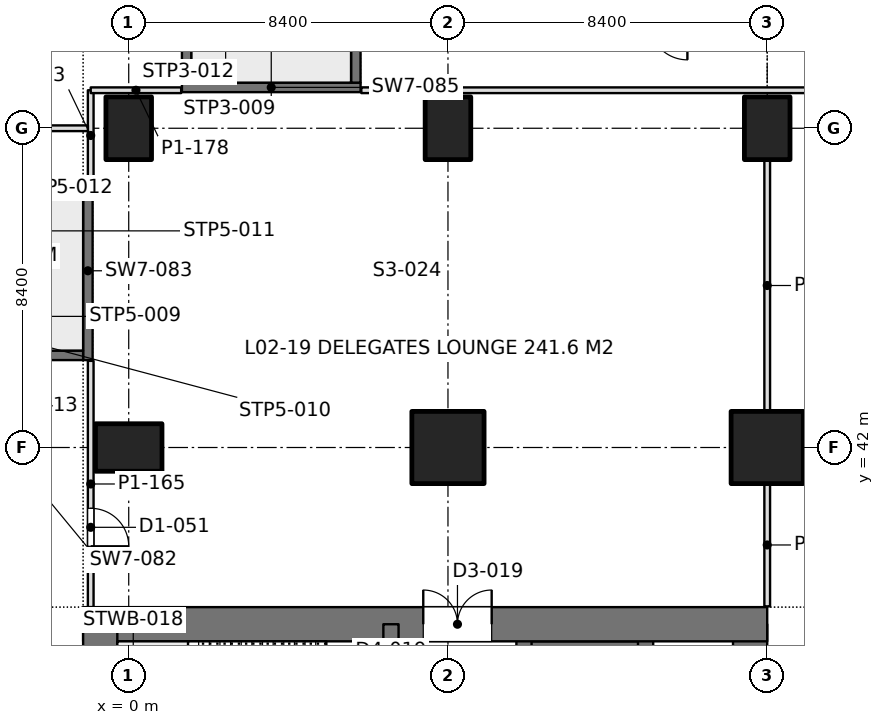
"""IFC4 building model, lengths in metres.
Left out: names, types, materials, properties, quantities, classifications, styles, units other than length and angle.
Written with IfcOpenShell. Run it as: python <this file> out.ifc"""

import sys

from ifc_helpers import new_model, si_unit, direction, frame, frame_2d, origin, origin_2d, place, context, subcontext, project, spatial, rectangle, extrude, element, fill, save


model = new_model("IFC4")
c1 = context("Model", 3, precision=1e-05, world=origin(), true_north=direction((0.0, 1.0)))
c2 = subcontext(c1, "Body", "Model", "MODEL_VIEW")
j1 = project(units=[si_unit("LENGTHUNIT", "METRE"), si_unit("PLANEANGLEUNIT", "RADIAN")], contexts=[c1])
p1 = place(None, origin())
s1 = spatial("IfcSite", under=j1, at=p1, CompositionType="ELEMENT")
p2 = place(p1, origin())
s2 = spatial("IfcBuilding", under=s1, at=p2, CompositionType="ELEMENT")
p3 = place(p2, frame((0.0, 0.0, 9.9)))
s3 = spatial("IfcBuildingStorey", under=s2, at=p3, CompositionType="ELEMENT", Elevation=9.9)
p4 = place(p3, frame((0.0, 42.0, 0.0), z_axis=(0.0, 0.0, 1.0), x_axis=(0.0, 1.0, 0.0)))
e1 = element("IfcColumn", 1, at=p4, inside=s3, PredefinedType="COLUMN", context=c2, shape_type="SweptSolid", body=[
    extrude(rectangle(XDim=1.25, YDim=1.75, at=origin_2d()), origin(), (0.0, 0.0, 1.0), 4.5),
])
p5 = place(p3, frame((0.0, 50.4, 0.0), z_axis=(0.0, 0.0, 1.0), x_axis=(1.0, 0.0, 0.0)))
e2 = element("IfcColumn", 2, at=p5, inside=s3, PredefinedType="COLUMN", context=c2, shape_type="SweptSolid", body=[
    extrude(rectangle(XDim=1.2, YDim=1.65, at=origin_2d()), origin(), (0.0, 0.0, 1.0), 4.5),
])
p6 = place(p3, frame((8.4, 42.0, 0.0), z_axis=(0.0, 0.0, 1.0), x_axis=(1.0, 0.0, 0.0)))
e3 = element("IfcColumn", 3, at=p6, inside=s3, PredefinedType="COLUMN", context=c2, shape_type="SweptSolid", body=[
    extrude(rectangle(XDim=1.9, YDim=1.9, at=origin_2d()), origin(), (0.0, 0.0, 1.0), 4.5),
])
p7 = place(p3, frame((8.4, 50.4, 0.0), z_axis=(0.0, 0.0, 1.0), x_axis=(1.0, 0.0, 0.0)))
e4 = element("IfcColumn", 4, at=p7, inside=s3, PredefinedType="COLUMN", context=c2, shape_type="SweptSolid", body=[
    extrude(rectangle(XDim=1.2, YDim=1.65, at=origin_2d()), origin(), (0.0, 0.0, 1.0), 4.5),
])
p8 = place(p3, frame((16.8, 42.0, 0.0), z_axis=(0.0, 0.0, 1.0), x_axis=(1.0, 0.0, 0.0)))
e5 = element("IfcColumn", 5, at=p8, inside=s3, PredefinedType="COLUMN", context=c2, shape_type="SweptSolid", body=[
    extrude(rectangle(XDim=1.9, YDim=1.9, at=origin_2d()), origin(), (0.0, 0.0, 1.0), 4.5),
])
p9 = place(p3, frame((16.8, 50.4, 0.0), z_axis=(0.0, 0.0, 1.0), x_axis=(1.0, 0.0, 0.0)))
e6 = element("IfcColumn", 6, at=p9, inside=s3, PredefinedType="COLUMN", context=c2, shape_type="SweptSolid", body=[
    extrude(rectangle(XDim=1.2, YDim=1.65, at=origin_2d()), origin(), (0.0, 0.0, 1.0), 4.5),
])
p10 = place(p3, frame((-1.2, 37.35, 0.0), z_axis=(0.0, 0.0, 1.0), x_axis=(1.0, 0.0, 0.0)))
e7 = element("IfcWall", 7, at=p10, inside=s3, PredefinedType="SHEAR", context=c2, shape_type="SweptSolid", body=[
    extrude(rectangle(XDim=18.0, YDim=0.9, at=frame_2d((9.0, 0.0))), origin(), (0.0, 0.0, 1.0), 4.5),
])
p11 = place(p10, frame((8.95, 0.0, 0.0)))
e8 = element("IfcOpeningElement", 8, at=p11, cuts=e7, PredefinedType="OPENING", context=c2, shape_type="SweptSolid", body=[
    extrude(rectangle(XDim=1.8, YDim=2.4, at=frame_2d((0.9, 1.2))), frame((0.0, 0.46, 0.0), z_axis=(0.0, -1.0, 0.0), x_axis=(1.0, 0.0, 0.0)), (0.0, 0.0, 1.0), 0.92),
])
for number, where, z_axis, x_axis in (
    (9, (-0.75, 13.05, 0.0), (0.0, 0.0, 1.0), (0.0, 1.0, 0.0)),
    (10, (16.35, 13.05, 0.0), (0.0, 0.0, 1.0), (0.0, 1.0, 0.0)),
):
    element("IfcWall", number, at=place(p3, frame(where, z_axis=z_axis, x_axis=x_axis)), inside=s3, PredefinedType="SHEAR", context=c2, shape_type="SweptSolid", body=[
        extrude(rectangle(XDim=24.3, YDim=0.9, at=frame_2d((12.15, 0.0))), origin(), (0.0, 0.0, 1.0), 4.5),
    ])
p12 = place(p3, frame((6.9, 13.05, 0.0), z_axis=(0.0, 0.0, 1.0), x_axis=(0.0, 1.0, 0.0)))
e11 = element("IfcWall", 11, at=p12, inside=s3, PredefinedType="SHEAR", context=c2, shape_type="SweptSolid", body=[
    extrude(rectangle(XDim=24.3, YDim=0.4, at=frame_2d((12.15, 0.0))), origin(), (0.0, 0.0, 1.0), 4.5),
])
p13 = place(p12, frame((1.3, 0.0, 0.0)))
e12 = element("IfcOpeningElement", 12, at=p13, cuts=e11, PredefinedType="OPENING", context=c2, shape_type="SweptSolid", body=[
    extrude(rectangle(XDim=1.0, YDim=2.2, at=frame_2d((0.5, 1.1))), frame((0.0, 0.21, 0.0), z_axis=(0.0, -1.0, 0.0), x_axis=(1.0, 0.0, 0.0)), (0.0, 0.0, 1.0), 0.42),
])
p14 = place(p12, frame((22.0, 0.0, 0.0)))
e13 = element("IfcOpeningElement", 13, at=p14, cuts=e11, PredefinedType="OPENING", context=c2, shape_type="SweptSolid", body=[
    extrude(rectangle(XDim=1.0, YDim=2.2, at=frame_2d((0.5, 1.1))), frame((0.0, 0.21, 0.0), z_axis=(0.0, -1.0, 0.0), x_axis=(1.0, 0.0, 0.0)), (0.0, 0.0, 1.0), 0.42),
])
p15 = place(p12, frame((5.55, 0.0, 0.0)))
e14 = element("IfcOpeningElement", 14, at=p15, cuts=e11, PredefinedType="OPENING", context=c2, shape_type="SweptSolid", body=[
    extrude(rectangle(XDim=1.0, YDim=2.2, at=frame_2d((0.5, 1.1))), frame((0.0, 0.21, 0.0), z_axis=(0.0, -1.0, 0.0), x_axis=(1.0, 0.0, 0.0)), (0.0, 0.0, 1.0), 0.42),
])
p16 = place(p12, frame((9.55, 0.0, 0.0)))
e15 = element("IfcOpeningElement", 15, at=p16, cuts=e11, PredefinedType="OPENING", context=c2, shape_type="SweptSolid", body=[
    extrude(rectangle(XDim=1.0, YDim=2.2, at=frame_2d((0.5, 1.1))), frame((0.0, 0.21, 0.0), z_axis=(0.0, -1.0, 0.0), x_axis=(1.0, 0.0, 0.0)), (0.0, 0.0, 1.0), 0.42),
])
p17 = place(p12, frame((12.8, 0.0, 0.0)))
e16 = element("IfcOpeningElement", 16, at=p17, cuts=e11, PredefinedType="OPENING", context=c2, shape_type="SweptSolid", body=[
    extrude(rectangle(XDim=1.1, YDim=2.2, at=frame_2d((0.55, 1.1))), frame((0.0, 0.21, 0.0), z_axis=(0.0, -1.0, 0.0), x_axis=(1.0, 0.0, 0.0)), (0.0, 0.0, 1.0), 0.42),
])
p18 = place(p12, frame((15.538, 0.0, 0.0)))
e17 = element("IfcOpeningElement", 17, at=p18, cuts=e11, PredefinedType="OPENING", context=c2, shape_type="SweptSolid", body=[
    extrude(rectangle(XDim=1.1, YDim=2.2, at=frame_2d((0.55, 1.1))), frame((0.0, 0.21, 0.0), z_axis=(0.0, -1.0, 0.0), x_axis=(1.0, 0.0, 0.0)), (0.0, 0.0, 1.0), 0.42),
])
p19 = place(p12, frame((18.262, 0.0, 0.0)))
e18 = element("IfcOpeningElement", 18, at=p19, cuts=e11, PredefinedType="OPENING", context=c2, shape_type="SweptSolid", body=[
    extrude(rectangle(XDim=1.1, YDim=2.2, at=frame_2d((0.55, 1.1))), frame((0.0, 0.21, 0.0), z_axis=(0.0, -1.0, 0.0), x_axis=(1.0, 0.0, 0.0)), (0.0, 0.0, 1.0), 0.42),
])
p20 = place(p3, frame((10.4, 13.05, 0.0), z_axis=(0.0, 0.0, 1.0), x_axis=(0.0, 1.0, 0.0)))
e19 = element("IfcWall", 19, at=p20, inside=s3, PredefinedType="SHEAR", context=c2, shape_type="SweptSolid", body=[
    extrude(rectangle(XDim=24.3, YDim=0.4, at=frame_2d((12.15, 0.0))), origin(), (0.0, 0.0, 1.0), 4.5),
])
p21 = place(p20, frame((1.5, 0.0, 0.0)))
e20 = element("IfcOpeningElement", 20, at=p21, cuts=e19, PredefinedType="OPENING", context=c2, shape_type="SweptSolid", body=[
    extrude(rectangle(XDim=1.1, YDim=2.2, at=frame_2d((0.55, 1.1))), frame((0.0, 0.21, 0.0), z_axis=(0.0, -1.0, 0.0), x_axis=(1.0, 0.0, 0.0)), (0.0, 0.0, 1.0), 0.42),
])
p22 = place(p20, frame((4.35, 0.0, 0.0)))
e21 = element("IfcOpeningElement", 21, at=p22, cuts=e19, PredefinedType="OPENING", context=c2, shape_type="SweptSolid", body=[
    extrude(rectangle(XDim=1.1, YDim=2.2, at=frame_2d((0.55, 1.1))), frame((0.0, 0.21, 0.0), z_axis=(0.0, -1.0, 0.0), x_axis=(1.0, 0.0, 0.0)), (0.0, 0.0, 1.0), 0.42),
])
p23 = place(p20, frame((7.2, 0.0, 0.0)))
e22 = element("IfcOpeningElement", 22, at=p23, cuts=e19, PredefinedType="OPENING", context=c2, shape_type="SweptSolid", body=[
    extrude(rectangle(XDim=1.1, YDim=2.2, at=frame_2d((0.55, 1.1))), frame((0.0, 0.21, 0.0), z_axis=(0.0, -1.0, 0.0), x_axis=(1.0, 0.0, 0.0)), (0.0, 0.0, 1.0), 0.42),
])
p24 = place(p20, frame((21.45, 0.0, 0.0)))
e23 = element("IfcOpeningElement", 23, at=p24, cuts=e19, PredefinedType="OPENING", context=c2, shape_type="SweptSolid", body=[
    extrude(rectangle(XDim=1.1, YDim=2.2, at=frame_2d((0.55, 1.1))), frame((0.0, 0.21, 0.0), z_axis=(0.0, -1.0, 0.0), x_axis=(1.0, 0.0, 0.0)), (0.0, 0.0, 1.0), 0.42),
])
p25 = place(p3, frame((13.6, 13.05, 0.0), z_axis=(0.0, 0.0, 1.0), x_axis=(0.0, 1.0, 0.0)))
e24 = element("IfcWall", 24, at=p25, inside=s3, PredefinedType="SHEAR", context=c2, shape_type="SweptSolid", body=[
    extrude(rectangle(XDim=24.3, YDim=0.4, at=frame_2d((12.15, 0.0))), origin(), (0.0, 0.0, 1.0), 4.5),
])
p26 = place(p3, frame((10.4, 36.625, 0.0), z_axis=(0.0, 0.0, 1.0), x_axis=(1.0, 0.0, 0.0)))
e25 = element("IfcWall", 25, at=p26, inside=s3, PredefinedType="SHEAR", context=c2, shape_type="SweptSolid", body=[
    extrude(rectangle(XDim=3.2, YDim=0.55, at=frame_2d((1.6, 0.0))), origin(), (0.0, 0.0, 1.0), 4.5),
])
p27 = place(p3, frame((-1.0, 51.4, 0.0), z_axis=(0.0, 0.0, 1.0), x_axis=(1.0, 0.0, 0.0)))
e26 = element("IfcWall", 26, at=p27, inside=s3, PredefinedType="PARTITIONING", context=c2, shape_type="SweptSolid", body=[
    extrude(rectangle(XDim=2.38, YDim=0.15, at=frame_2d((1.19, 0.0))), origin(), (0.0, 0.0, 1.0), 3.65),
])
p28 = place(p3, frame((6.12, 51.4, 0.0), z_axis=(0.0, 0.0, 1.0), x_axis=(1.0, 0.0, 0.0)))
e27 = element("IfcWall", 27, at=p28, inside=s3, PredefinedType="PARTITIONING", context=c2, shape_type="SweptSolid", body=[
    extrude(rectangle(XDim=38.16, YDim=0.15, at=frame_2d((19.08, 0.0))), origin(), (0.0, 0.0, 1.0), 3.65),
])
p29 = place(p28, frame((13.98, 0.0, 0.0)))
e28 = element("IfcOpeningElement", 28, at=p29, cuts=e27, PredefinedType="OPENING", context=c2, shape_type="SweptSolid", body=[
    extrude(rectangle(XDim=1.8, YDim=2.2, at=frame_2d((0.9, 1.1))), frame((0.0, 0.085, 0.0), z_axis=(0.0, -1.0, 0.0), x_axis=(1.0, 0.0, 0.0)), (0.0, 0.0, 1.0), 0.17),
])
p30 = place(p28, frame((22.38, 0.0, 0.0)))
e29 = element("IfcOpeningElement", 29, at=p30, cuts=e27, PredefinedType="OPENING", context=c2, shape_type="SweptSolid", body=[
    extrude(rectangle(XDim=1.8, YDim=2.2, at=frame_2d((0.9, 1.1))), frame((0.0, 0.085, 0.0), z_axis=(0.0, -1.0, 0.0), x_axis=(1.0, 0.0, 0.0)), (0.0, 0.0, 1.0), 0.17),
])
p31 = place(p3, frame((-8.001, 50.4, 0.0), z_axis=(0.0, 0.0, 1.0), x_axis=(1.0, 0.0, 0.0)))
e30 = element("IfcWall", 30, at=p31, inside=s3, PredefinedType="PARTITIONING", context=c2, shape_type="SweptSolid", body=[
    extrude(rectangle(XDim=6.927, YDim=0.15, at=frame_2d((3.463, 0.0))), origin(), (0.0, 0.0, 1.0), 3.65),
])
p32 = place(p31, frame((2.501, 0.0, 0.0)))
e31 = element("IfcOpeningElement", 31, at=p32, cuts=e30, PredefinedType="OPENING", context=c2, shape_type="SweptSolid", body=[
    extrude(rectangle(XDim=1.0, YDim=2.2, at=frame_2d((0.5, 1.1))), frame((0.0, 0.085, 0.0), z_axis=(0.0, -1.0, 0.0), x_axis=(1.0, 0.0, 0.0)), (0.0, 0.0, 1.0), 0.17),
])
p33 = place(p3, frame((-1.0, 37.8, 0.0), z_axis=(0.0, 0.0, 1.0), x_axis=(0.0, 1.0, 0.0)))
e32 = element("IfcWall", 32, at=p33, inside=s3, PredefinedType="PARTITIONING", context=c2, shape_type="SweptSolid", body=[
    extrude(rectangle(XDim=6.48, YDim=0.15, at=frame_2d((3.24, 0.0))), origin(), (0.0, 0.0, 1.0), 3.65),
])
p34 = place(p33, frame((1.6, 0.0, 0.0)))
e33 = element("IfcOpeningElement", 33, at=p34, cuts=e32, PredefinedType="OPENING", context=c2, shape_type="SweptSolid", body=[
    extrude(rectangle(XDim=1.0, YDim=2.2, at=frame_2d((0.5, 1.1))), frame((0.0, 0.085, 0.0), z_axis=(0.0, -1.0, 0.0), x_axis=(1.0, 0.0, 0.0)), (0.0, 0.0, 1.0), 0.17),
])
p35 = place(p3, frame((-1.0, 49.02, 0.0), z_axis=(0.0, 0.0, 1.0), x_axis=(0.0, 1.0, 0.0)))
e34 = element("IfcWall", 34, at=p35, inside=s3, PredefinedType="PARTITIONING", context=c2, shape_type="SweptSolid", body=[
    extrude(rectangle(XDim=2.38, YDim=0.15, at=frame_2d((1.19, 0.0))), origin(), (0.0, 0.0, 1.0), 3.65),
])
p36 = place(p3, frame((16.8, 37.82, 0.0), z_axis=(0.0, 0.0, 1.0), x_axis=(0.0, 1.0, 0.0)))
e35 = element("IfcWall", 35, at=p36, inside=s3, PredefinedType="PARTITIONING", context=c2, shape_type="SweptSolid", body=[
    extrude(rectangle(XDim=3.231, YDim=0.15, at=frame_2d((1.615, 0.0))), origin(), (0.0, 0.0, 1.0), 3.94),
])
p37 = place(p3, frame((16.8, 42.949, 0.0), z_axis=(0.0, 0.0, 1.0), x_axis=(0.0, 1.0, 0.0)))
e36 = element("IfcWall", 36, at=p37, inside=s3, PredefinedType="PARTITIONING", context=c2, shape_type="SweptSolid", body=[
    extrude(rectangle(XDim=6.627, YDim=0.15, at=frame_2d((3.313, 0.0))), origin(), (0.0, 0.0, 1.0), 3.65),
])
p38 = place(p3, frame((1.525, 59.702, 0.0), z_axis=(0.0, 0.0, 1.0), x_axis=(0.0, -1.0, 0.0)))
e37 = element("IfcWall", 37, at=p38, inside=s3, PredefinedType="SOLIDWALL", context=c2, shape_type="SweptSolid", body=[
    extrude(rectangle(XDim=8.102, YDim=0.25, at=frame_2d((4.051, 0.0))), origin(), (0.0, 0.0, 1.0), 4.5),
])
p39 = place(p3, frame((5.975, 59.702, 0.0), z_axis=(0.0, 0.0, 1.0), x_axis=(0.0, -1.0, 0.0)))
e38 = element("IfcWall", 38, at=p39, inside=s3, PredefinedType="SOLIDWALL", context=c2, shape_type="SweptSolid", body=[
    extrude(rectangle(XDim=8.102, YDim=0.25, at=frame_2d((4.051, 0.0))), origin(), (0.0, 0.0, 1.0), 4.5),
])
p40 = place(p39, frame((0.15, 0.0, 0.0)))
e39 = element("IfcOpeningElement", 39, at=p40, cuts=e38, PredefinedType="OPENING", context=c2, shape_type="SweptSolid", body=[
    extrude(rectangle(XDim=2.0, YDim=2.2, at=frame_2d((1.0, 1.1))), frame((0.0, 0.135, 0.0), z_axis=(0.0, -1.0, 0.0), x_axis=(1.0, 0.0, 0.0)), (0.0, 0.0, 1.0), 0.27),
])
p41 = place(p3, frame((1.4, 51.475, 0.0), z_axis=(0.0, 0.0, 1.0), x_axis=(1.0, 0.0, 0.0)))
e40 = element("IfcWall", 40, at=p41, inside=s3, PredefinedType="SOLIDWALL", context=c2, shape_type="SweptSolid", body=[
    extrude(rectangle(XDim=4.7, YDim=0.25, at=frame_2d((2.35, 0.0))), origin(), (0.0, 0.0, 1.0), 4.5),
])
p42 = place(p3, frame((-9.302, 44.425, 0.0), z_axis=(0.0, 0.0, 1.0), x_axis=(1.0, 0.0, 0.0)))
e41 = element("IfcWall", 41, at=p42, inside=s3, PredefinedType="SOLIDWALL", context=c2, shape_type="SweptSolid", body=[
    extrude(rectangle(XDim=8.102, YDim=0.25, at=frame_2d((4.051, 0.0))), origin(), (0.0, 0.0, 1.0), 4.5),
])
p43 = place(p42, frame((0.15, 0.0, 0.0)))
e42 = element("IfcOpeningElement", 42, at=p43, cuts=e41, PredefinedType="OPENING", context=c2, shape_type="SweptSolid", body=[
    extrude(rectangle(XDim=2.0, YDim=2.2, at=frame_2d((1.0, 1.1))), frame((0.0, 0.135, 0.0), z_axis=(0.0, -1.0, 0.0), x_axis=(1.0, 0.0, 0.0)), (0.0, 0.0, 1.0), 0.27),
])
p44 = place(p3, frame((-9.302, 48.875, 0.0), z_axis=(0.0, 0.0, 1.0), x_axis=(1.0, 0.0, 0.0)))
e43 = element("IfcWall", 43, at=p44, inside=s3, PredefinedType="SOLIDWALL", context=c2, shape_type="SweptSolid", body=[
    extrude(rectangle(XDim=8.102, YDim=0.25, at=frame_2d((4.051, 0.0))), origin(), (0.0, 0.0, 1.0), 4.5),
])
p45 = place(p3, frame((-1.075, 44.3, 0.0), z_axis=(0.0, 0.0, 1.0), x_axis=(0.0, 1.0, 0.0)))
e44 = element("IfcWall", 44, at=p45, inside=s3, PredefinedType="SOLIDWALL", context=c2, shape_type="SweptSolid", body=[
    extrude(rectangle(XDim=4.7, YDim=0.25, at=frame_2d((2.35, 0.0))), origin(), (0.0, 0.0, 1.0), 4.5),
])
p46 = place(p11, origin())
e45 = element("IfcDoor", 45, at=p46, inside=s3, OperationType="DOUBLE_DOOR_SINGLE_SWING", PredefinedType="DOOR", context=c2, shape_type="SweptSolid", body=[
    extrude(rectangle(XDim=1.8, YDim=2.4, at=frame_2d((0.9, 1.2))), frame((0.0, 0.025, 0.0), z_axis=(0.0, -1.0, 0.0), x_axis=(1.0, 0.0, 0.0)), (0.0, 0.0, 1.0), 0.05),
])
fill(e8, e45)
p47 = place(p34, frame((1.0, 0.0, 0.0), z_axis=(0.0, 0.0, 1.0), x_axis=(-1.0, 0.0, 0.0)))
e46 = element("IfcDoor", 46, at=p47, inside=s3, OperationType="SINGLE_SWING_RIGHT", PredefinedType="DOOR", context=c2, shape_type="SweptSolid", body=[
    extrude(rectangle(XDim=1.0, YDim=2.2, at=frame_2d((0.5, 1.1))), frame((0.0, 0.025, 0.0), z_axis=(0.0, -1.0, 0.0), x_axis=(1.0, 0.0, 0.0)), (0.0, 0.0, 1.0), 0.05),
])
fill(e33, e46)
save(model, sys.argv[1])
